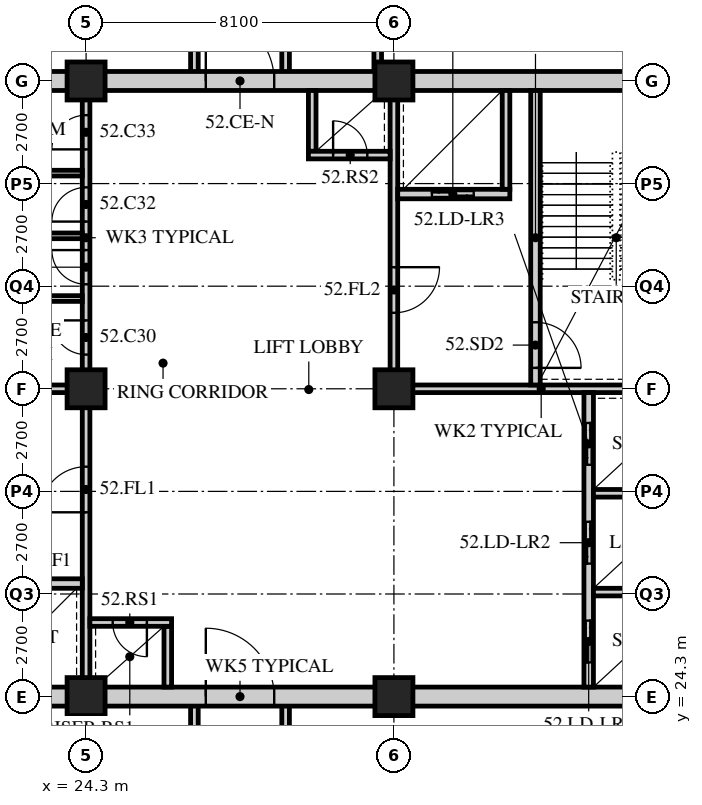
"""IFC4 building model, lengths in metres.
Left out: names, types, materials, properties, quantities, classifications, styles, units other than length and angle.
Written with IfcOpenShell. Run it as: python <this file> out.ifc"""

import sys

from ifc_helpers import new_model, si_unit, direction, frame, frame_2d, origin, origin_2d, place, context, subcontext, project, spatial, rectangle, hollow_rectangle, extrude, element, fill, save


model = new_model("IFC4")
c1 = context("Model", 3, precision=1e-05, world=origin(), true_north=direction((0.0, 1.0)))
c2 = subcontext(c1, "Body", "Model", "MODEL_VIEW")
j1 = project(units=[si_unit("LENGTHUNIT", "METRE"), si_unit("PLANEANGLEUNIT", "RADIAN")], contexts=[c1])
p1 = place(None, origin())
s1 = spatial("IfcSite", under=j1, at=p1, CompositionType="ELEMENT")
p2 = place(p1, origin())
s2 = spatial("IfcBuilding", under=s1, at=p2, CompositionType="ELEMENT")
p3 = place(p2, frame((0.0, 0.0, 202.8)))
s3 = spatial("IfcBuildingStorey", under=s2, at=p3, CompositionType="ELEMENT", Elevation=202.8)
for number, where, z_axis, x_axis in (
    (1, (24.3, 24.3, 0.0), (0.0, 0.0, 1.0), (1.0, 0.0, 0.0)),
    (2, (24.3, 32.4, 0.0), (0.0, 0.0, 1.0), (1.0, 0.0, 0.0)),
    (3, (24.3, 40.5, 0.0), (0.0, 0.0, 1.0), (1.0, 0.0, 0.0)),
    (4, (32.4, 24.3, 0.0), (0.0, 0.0, 1.0), (1.0, 0.0, 0.0)),
    (5, (32.4, 32.4, 0.0), (0.0, 0.0, 1.0), (1.0, 0.0, 0.0)),
    (6, (32.4, 40.5, 0.0), (0.0, 0.0, 1.0), (1.0, 0.0, 0.0)),
):
    element("IfcColumn", number, at=place(p3, frame(where, z_axis=z_axis, x_axis=x_axis)), inside=s3, PredefinedType="COLUMN", context=c2, shape_type="SweptSolid", body=[
        extrude(hollow_rectangle(XDim=1.0, YDim=1.0, WallThickness=0.1, at=origin_2d()), origin(), (0.0, 0.0, 1.0), 3.6),
    ])
for number, where, z_axis, x_axis in (
    (7, (27.15, 20.7, 0.0), (0.0, 0.0, 1.0), (0.0, 1.0, 0.0)),
    (8, (29.55, 20.7, 0.0), (0.0, 0.0, 1.0), (0.0, 1.0, 0.0)),
):
    element("IfcWall", number, at=place(p3, frame(where, z_axis=z_axis, x_axis=x_axis)), inside=s3, PredefinedType="SOLIDWALL", context=c2, shape_type="SweptSolid", body=[
        extrude(rectangle(XDim=3.6, YDim=0.2, at=frame_2d((1.8, 0.0))), origin(), (0.0, 0.0, 1.0), 3.39),
    ])
p4 = place(p3, frame((31.974, 45.45, 0.0), z_axis=(0.0, 0.0, 1.0), x_axis=(0.0, -1.0, 0.0)))
e9 = element("IfcWall", 9, at=p4, inside=s3, PredefinedType="SOLIDWALL", context=c2, shape_type="SweptSolid", body=[
    extrude(rectangle(XDim=4.95, YDim=0.2, at=frame_2d((2.475, 0.0))), origin(), (0.0, 0.0, 1.0), 2.69),
])
for number, where, z_axis, x_axis in (
    (10, (27.15, 40.5, 0.0), (0.0, 0.0, 1.0), (0.0, 1.0, 0.0)),
    (11, (29.55, 40.5, 0.0), (0.0, 0.0, 1.0), (0.0, 1.0, 0.0)),
):
    element("IfcWall", number, at=place(p3, frame(where, z_axis=z_axis, x_axis=x_axis)), inside=s3, PredefinedType="SOLIDWALL", context=c2, shape_type="SweptSolid", body=[
        extrude(rectangle(XDim=4.95, YDim=0.2, at=frame_2d((2.475, 0.0))), origin(), (0.0, 0.0, 1.0), 3.39),
    ])
p5 = place(p3, frame((15.95, 24.3, 0.0), z_axis=(0.0, 0.0, 1.0), x_axis=(1.0, 0.0, 0.0)))
e12 = element("IfcWall", 12, at=p5, inside=s3, PredefinedType="SOLIDWALL", context=c2, shape_type="SweptSolid", body=[
    extrude(rectangle(XDim=24.8, YDim=0.5, at=frame_2d((12.4, 0.0))), origin(), (0.0, 0.0, 1.0), 2.74),
])
p6 = place(p5, frame((11.5, 0.0, 0.0)))
e13 = element("IfcOpeningElement", 13, at=p6, cuts=e12, PredefinedType="OPENING", context=c2, shape_type="SweptSolid", body=[
    extrude(rectangle(XDim=1.8, YDim=2.4, at=frame_2d((0.9, 1.2))), frame((0.0, 0.26, 0.0), z_axis=(0.0, -1.0, 0.0), x_axis=(1.0, 0.0, 0.0)), (0.0, 0.0, 1.0), 0.52),
])
p7 = place(p3, frame((15.95, 40.5, 0.0), z_axis=(0.0, 0.0, 1.0), x_axis=(1.0, 0.0, 0.0)))
e14 = element("IfcWall", 14, at=p7, inside=s3, PredefinedType="SOLIDWALL", context=c2, shape_type="SweptSolid", body=[
    extrude(rectangle(XDim=24.8, YDim=0.5, at=frame_2d((12.4, 0.0))), origin(), (0.0, 0.0, 1.0), 2.74),
])
p8 = place(p7, frame((11.5, 0.0, 0.0)))
e15 = element("IfcOpeningElement", 15, at=p8, cuts=e14, PredefinedType="OPENING", context=c2, shape_type="SweptSolid", body=[
    extrude(rectangle(XDim=1.8, YDim=2.4, at=frame_2d((0.9, 1.2))), frame((0.0, 0.26, 0.0), z_axis=(0.0, -1.0, 0.0), x_axis=(1.0, 0.0, 0.0)), (0.0, 0.0, 1.0), 0.52),
])
p9 = place(p3, frame((16.45, 32.4, 0.0), z_axis=(0.0, 0.0, 1.0), x_axis=(1.0, 0.0, 0.0)))
e16 = element("IfcWall", 16, at=p9, inside=s3, PredefinedType="SOLIDWALL", context=c2, shape_type="SweptSolid", body=[
    extrude(rectangle(XDim=7.95, YDim=0.2, at=frame_2d((3.975, 0.0))), origin(), (0.0, 0.0, 1.0), 2.778),
])
p10 = place(p3, frame((24.3, 24.55, 0.0), z_axis=(0.0, 0.0, 1.0), x_axis=(0.0, 1.0, 0.0)))
e17 = element("IfcWall", 17, at=p10, inside=s3, PredefinedType="SOLIDWALL", context=c2, shape_type="SweptSolid", body=[
    extrude(rectangle(XDim=7.75, YDim=0.2, at=frame_2d((3.875, 0.0))), origin(), (0.0, 0.0, 1.0), 2.778),
])
p11 = place(p10, frame((4.6, 0.0, 0.0)))
e18 = element("IfcOpeningElement", 18, at=p11, cuts=e17, PredefinedType="OPENING", context=c2, shape_type="SweptSolid", body=[
    extrude(rectangle(XDim=1.2, YDim=2.1, at=frame_2d((0.6, 1.05))), frame((0.0, 0.11, 0.0), z_axis=(0.0, -1.0, 0.0), x_axis=(1.0, 0.0, 0.0)), (0.0, 0.0, 1.0), 0.22),
])
p12 = place(p3, frame((21.25, 27.275, 0.0), z_axis=(0.0, 0.0, 1.0), x_axis=(1.0, 0.0, 0.0)))
e19 = element("IfcWall", 19, at=p12, inside=s3, PredefinedType="SOLIDWALL", context=c2, shape_type="SweptSolid", body=[
    extrude(rectangle(XDim=2.95, YDim=0.25, at=frame_2d((1.475, 0.0))), origin(), (0.0, 0.0, 1.0), 3.39),
])
p13 = place(p12, frame((0.95, 0.0, 0.0)))
e20 = element("IfcOpeningElement", 20, at=p13, cuts=e19, PredefinedType="OPENING", context=c2, shape_type="SweptSolid", body=[
    extrude(rectangle(XDim=1.1, YDim=2.4, at=frame_2d((0.55, 1.2))), frame((0.0, 0.135, 0.0), z_axis=(0.0, -1.0, 0.0), x_axis=(1.0, 0.0, 0.0)), (0.0, 0.0, 1.0), 0.27),
])
p14 = place(p3, frame((26.45, 24.55, 0.0), z_axis=(0.0, 0.0, 1.0), x_axis=(0.0, 1.0, 0.0)))
e21 = element("IfcWall", 21, at=p14, inside=s3, PredefinedType="SOLIDWALL", context=c2, shape_type="SweptSolid", body=[
    extrude(rectangle(XDim=1.6, YDim=0.2, at=frame_2d((0.8, 0.0))), origin(), (0.0, 0.0, 1.0), 3.39),
])
p15 = place(p3, frame((24.4, 26.25, 0.0), z_axis=(0.0, 0.0, 1.0), x_axis=(1.0, 0.0, 0.0)))
e22 = element("IfcWall", 22, at=p15, inside=s3, PredefinedType="SOLIDWALL", context=c2, shape_type="SweptSolid", body=[
    extrude(rectangle(XDim=2.15, YDim=0.2, at=frame_2d((1.075, 0.0))), origin(), (0.0, 0.0, 1.0), 3.39),
])
p16 = place(p15, frame((0.6, 0.0, 0.0)))
e23 = element("IfcOpeningElement", 23, at=p16, cuts=e22, PredefinedType="OPENING", context=c2, shape_type="SweptSolid", body=[
    extrude(rectangle(XDim=0.9, YDim=2.1, at=frame_2d((0.45, 1.05))), frame((0.0, 0.11, 0.0), z_axis=(0.0, -1.0, 0.0), x_axis=(1.0, 0.0, 0.0)), (0.0, 0.0, 1.0), 0.22),
])
p17 = place(p3, frame((32.3, 32.4, 0.0), z_axis=(0.0, 0.0, 1.0), x_axis=(1.0, 0.0, 0.0)))
e24 = element("IfcWall", 24, at=p17, inside=s3, PredefinedType="SOLIDWALL", context=c2, shape_type="SweptSolid", body=[
    extrude(rectangle(XDim=7.95, YDim=0.2, at=frame_2d((3.975, 0.0))), origin(), (0.0, 0.0, 1.0), 2.778),
])
p18 = place(p3, frame((32.4, 32.5, 0.0), z_axis=(0.0, 0.0, 1.0), x_axis=(0.0, 1.0, 0.0)))
e25 = element("IfcWall", 25, at=p18, inside=s3, PredefinedType="SOLIDWALL", context=c2, shape_type="SweptSolid", body=[
    extrude(rectangle(XDim=7.75, YDim=0.2, at=frame_2d((3.875, 0.0))), origin(), (0.0, 0.0, 1.0), 2.778),
])
p19 = place(p18, frame((1.9, 0.0, 0.0)))
e26 = element("IfcOpeningElement", 26, at=p19, cuts=e25, PredefinedType="OPENING", context=c2, shape_type="SweptSolid", body=[
    extrude(rectangle(XDim=1.2, YDim=2.1, at=frame_2d((0.6, 1.05))), frame((0.0, 0.11, 0.0), z_axis=(0.0, -1.0, 0.0), x_axis=(1.0, 0.0, 0.0)), (0.0, 0.0, 1.0), 0.22),
])
p20 = place(p3, frame((37.525, 24.55, 0.0), z_axis=(0.0, 0.0, 1.0), x_axis=(0.0, 1.0, 0.0)))
e27 = element("IfcWall", 27, at=p20, inside=s3, PredefinedType="SOLIDWALL", context=c2, shape_type="SweptSolid", body=[
    extrude(rectangle(XDim=7.75, YDim=0.25, at=frame_2d((3.875, 0.0))), origin(), (0.0, 0.0, 1.0), 3.39),
])
p21 = place(p20, frame((0.65, 0.0, 0.0)))
e28 = element("IfcOpeningElement", 28, at=p21, cuts=e27, PredefinedType="OPENING", context=c2, shape_type="SweptSolid", body=[
    extrude(rectangle(XDim=1.1, YDim=2.4, at=frame_2d((0.55, 1.2))), frame((0.0, 0.135, 0.0), z_axis=(0.0, -1.0, 0.0), x_axis=(1.0, 0.0, 0.0)), (0.0, 0.0, 1.0), 0.27),
])
p22 = place(p20, frame((3.25, 0.0, 0.0)))
e29 = element("IfcOpeningElement", 29, at=p22, cuts=e27, PredefinedType="OPENING", context=c2, shape_type="SweptSolid", body=[
    extrude(rectangle(XDim=1.1, YDim=2.4, at=frame_2d((0.55, 1.2))), frame((0.0, 0.135, 0.0), z_axis=(0.0, -1.0, 0.0), x_axis=(1.0, 0.0, 0.0)), (0.0, 0.0, 1.0), 0.27),
])
p23 = place(p20, frame((5.85, 0.0, 0.0)))
e30 = element("IfcOpeningElement", 30, at=p23, cuts=e27, PredefinedType="OPENING", context=c2, shape_type="SweptSolid", body=[
    extrude(rectangle(XDim=1.1, YDim=2.4, at=frame_2d((0.55, 1.2))), frame((0.0, 0.135, 0.0), z_axis=(0.0, -1.0, 0.0), x_axis=(1.0, 0.0, 0.0)), (0.0, 0.0, 1.0), 0.27),
])
for number, where, z_axis, x_axis in (
    (31, (37.65, 27.05, 0.0), (0.0, 0.0, 1.0), (1.0, 0.0, 0.0)),
    (32, (37.65, 29.65, 0.0), (0.0, 0.0, 1.0), (1.0, 0.0, 0.0)),
):
    element("IfcWall", number, at=place(p3, frame(where, z_axis=z_axis, x_axis=x_axis)), inside=s3, PredefinedType="SOLIDWALL", context=c2, shape_type="SweptSolid", body=[
        extrude(rectangle(XDim=2.6, YDim=0.2, at=frame_2d((1.3, 0.0))), origin(), (0.0, 0.0, 1.0), 3.39),
    ])
p24 = place(p3, frame((36.125, 32.5, 0.0), z_axis=(0.0, 0.0, 1.0), x_axis=(0.0, 1.0, 0.0)))
e33 = element("IfcWall", 33, at=p24, inside=s3, PredefinedType="SOLIDWALL", context=c2, shape_type="SweptSolid", body=[
    extrude(rectangle(XDim=7.75, YDim=0.25, at=frame_2d((3.875, 0.0))), origin(), (0.0, 0.0, 1.0), 3.39),
])
p25 = place(p24, frame((0.45, 0.0, 0.0)))
e34 = element("IfcOpeningElement", 34, at=p25, cuts=e33, PredefinedType="OPENING", context=c2, shape_type="SweptSolid", body=[
    extrude(rectangle(XDim=1.2, YDim=2.1, at=frame_2d((0.6, 1.05))), frame((0.0, 0.135, 0.0), z_axis=(0.0, -1.0, 0.0), x_axis=(1.0, 0.0, 0.0)), (0.0, 0.0, 1.0), 0.27),
])
p26 = place(p3, frame((32.5, 37.525, 0.0), z_axis=(0.0, 0.0, 1.0), x_axis=(1.0, 0.0, 0.0)))
e35 = element("IfcWall", 35, at=p26, inside=s3, PredefinedType="SOLIDWALL", context=c2, shape_type="SweptSolid", body=[
    extrude(rectangle(XDim=2.95, YDim=0.25, at=frame_2d((1.475, 0.0))), origin(), (0.0, 0.0, 1.0), 3.39),
])
p27 = place(p26, frame((0.9, 0.0, 0.0)))
e36 = element("IfcOpeningElement", 36, at=p27, cuts=e35, PredefinedType="OPENING", context=c2, shape_type="SweptSolid", body=[
    extrude(rectangle(XDim=1.1, YDim=2.4, at=frame_2d((0.55, 1.2))), frame((0.0, 0.135, 0.0), z_axis=(0.0, -1.0, 0.0), x_axis=(1.0, 0.0, 0.0)), (0.0, 0.0, 1.0), 0.27),
])
p28 = place(p3, frame((35.35, 37.65, 0.0), z_axis=(0.0, 0.0, 1.0), x_axis=(0.0, 1.0, 0.0)))
e37 = element("IfcWall", 37, at=p28, inside=s3, PredefinedType="SOLIDWALL", context=c2, shape_type="SweptSolid", body=[
    extrude(rectangle(XDim=2.6, YDim=0.2, at=frame_2d((1.3, 0.0))), origin(), (0.0, 0.0, 1.0), 3.39),
])
p29 = place(p3, frame((30.25, 38.65, 0.0), z_axis=(0.0, 0.0, 1.0), x_axis=(0.0, 1.0, 0.0)))
e38 = element("IfcWall", 38, at=p29, inside=s3, PredefinedType="SOLIDWALL", context=c2, shape_type="SweptSolid", body=[
    extrude(rectangle(XDim=1.6, YDim=0.2, at=frame_2d((0.8, 0.0))), origin(), (0.0, 0.0, 1.0), 3.39),
])
p30 = place(p3, frame((30.15, 38.55, 0.0), z_axis=(0.0, 0.0, 1.0), x_axis=(1.0, 0.0, 0.0)))
e39 = element("IfcWall", 39, at=p30, inside=s3, PredefinedType="SOLIDWALL", context=c2, shape_type="SweptSolid", body=[
    extrude(rectangle(XDim=2.15, YDim=0.2, at=frame_2d((1.075, 0.0))), origin(), (0.0, 0.0, 1.0), 3.39),
])
p31 = place(p30, frame((0.65, 0.0, 0.0)))
e40 = element("IfcOpeningElement", 40, at=p31, cuts=e39, PredefinedType="OPENING", context=c2, shape_type="SweptSolid", body=[
    extrude(rectangle(XDim=0.9, YDim=2.1, at=frame_2d((0.45, 1.05))), frame((0.0, 0.11, 0.0), z_axis=(0.0, -1.0, 0.0), x_axis=(1.0, 0.0, 0.0)), (0.0, 0.0, 1.0), 0.22),
])
p32 = place(p3, frame((24.3, 32.5, 0.0), z_axis=(0.0, 0.0, 1.0), x_axis=(0.0, 1.0, 0.0)))
e41 = element("IfcWall", 41, at=p32, inside=s3, PredefinedType="PARTITIONING", context=c2, shape_type="SweptSolid", body=[
    extrude(rectangle(XDim=7.75, YDim=0.2, at=frame_2d((3.875, 0.0))), origin(), (0.0, 0.0, 1.0), 2.778),
])
p33 = place(p32, frame((0.8, 0.0, 0.0)))
e42 = element("IfcOpeningElement", 42, at=p33, cuts=e41, PredefinedType="OPENING", context=c2, shape_type="SweptSolid", body=[
    extrude(rectangle(XDim=0.9, YDim=2.1, at=frame_2d((0.45, 1.05))), frame((0.0, 0.11, 0.0), z_axis=(0.0, -1.0, 0.0), x_axis=(1.0, 0.0, 0.0)), (0.0, 0.0, 1.0), 0.22),
])
p34 = place(p32, frame((2.65, 0.0, 0.0)))
e43 = element("IfcOpeningElement", 43, at=p34, cuts=e41, PredefinedType="OPENING", context=c2, shape_type="SweptSolid", body=[
    extrude(rectangle(XDim=0.9, YDim=2.1, at=frame_2d((0.45, 1.05))), frame((0.0, 0.11, 0.0), z_axis=(0.0, -1.0, 0.0), x_axis=(1.0, 0.0, 0.0)), (0.0, 0.0, 1.0), 0.22),
])
p35 = place(p32, frame((4.3, 0.0, 0.0)))
e44 = element("IfcOpeningElement", 44, at=p35, cuts=e41, PredefinedType="OPENING", context=c2, shape_type="SweptSolid", body=[
    extrude(rectangle(XDim=0.9, YDim=2.1, at=frame_2d((0.45, 1.05))), frame((0.0, 0.11, 0.0), z_axis=(0.0, -1.0, 0.0), x_axis=(1.0, 0.0, 0.0)), (0.0, 0.0, 1.0), 0.22),
])
p36 = place(p32, frame((6.2, 0.0, 0.0)))
e45 = element("IfcOpeningElement", 45, at=p36, cuts=e41, PredefinedType="OPENING", context=c2, shape_type="SweptSolid", body=[
    extrude(rectangle(XDim=0.9, YDim=2.1, at=frame_2d((0.45, 1.05))), frame((0.0, 0.11, 0.0), z_axis=(0.0, -1.0, 0.0), x_axis=(1.0, 0.0, 0.0)), (0.0, 0.0, 1.0), 0.22),
])
for number, where, z_axis, x_axis in (
    (46, (21.05, 34.775, 0.0), (0.0, 0.0, 1.0), (1.0, 0.0, 0.0)),
    (47, (21.05, 36.425, 0.0), (0.0, 0.0, 1.0), (1.0, 0.0, 0.0)),
):
    element("IfcWall", number, at=place(p3, frame(where, z_axis=z_axis, x_axis=x_axis)), inside=s3, PredefinedType="PARTITIONING", context=c2, shape_type="SweptSolid", body=[
        extrude(rectangle(XDim=3.15, YDim=0.15, at=frame_2d((1.575, 0.0))), origin(), (0.0, 0.0, 1.0), 3.39),
    ])
p37 = place(p3, frame((21.2, 38.075, 0.0), z_axis=(0.0, 0.0, 1.0), x_axis=(1.0, 0.0, 0.0)))
e48 = element("IfcWall", 48, at=p37, inside=s3, PredefinedType="PARTITIONING", context=c2, shape_type="SweptSolid", body=[
    extrude(rectangle(XDim=3.0, YDim=0.15, at=frame_2d((1.5, 0.0))), origin(), (0.0, 0.0, 1.0), 3.39),
])
p38 = place(p33, origin())
e49 = element("IfcDoor", 49, at=p38, inside=s3, OperationType="SINGLE_SWING_RIGHT", PredefinedType="DOOR", context=c2, shape_type="SweptSolid", body=[
    extrude(rectangle(XDim=0.9, YDim=2.1, at=frame_2d((0.45, 1.05))), frame((0.0, 0.025, 0.0), z_axis=(0.0, -1.0, 0.0), x_axis=(1.0, 0.0, 0.0)), (0.0, 0.0, 1.0), 0.05),
])
fill(e42, e49)
p39 = place(p34, origin())
e50 = element("IfcDoor", 50, at=p39, inside=s3, OperationType="SINGLE_SWING_RIGHT", PredefinedType="DOOR", context=c2, shape_type="SweptSolid", body=[
    extrude(rectangle(XDim=0.9, YDim=2.1, at=frame_2d((0.45, 1.05))), frame((0.0, 0.025, 0.0), z_axis=(0.0, -1.0, 0.0), x_axis=(1.0, 0.0, 0.0)), (0.0, 0.0, 1.0), 0.05),
])
fill(e43, e50)
p40 = place(p35, origin())
e51 = element("IfcDoor", 51, at=p40, inside=s3, OperationType="SINGLE_SWING_LEFT", PredefinedType="DOOR", context=c2, shape_type="SweptSolid", body=[
    extrude(rectangle(XDim=0.9, YDim=2.1, at=frame_2d((0.45, 1.05))), frame((0.0, 0.025, 0.0), z_axis=(0.0, -1.0, 0.0), x_axis=(1.0, 0.0, 0.0)), (0.0, 0.0, 1.0), 0.05),
])
fill(e44, e51)
p41 = place(p36, origin())
e52 = element("IfcDoor", 52, at=p41, inside=s3, OperationType="SINGLE_SWING_LEFT", PredefinedType="DOOR", context=c2, shape_type="SweptSolid", body=[
    extrude(rectangle(XDim=0.9, YDim=2.1, at=frame_2d((0.45, 1.05))), frame((0.0, 0.025, 0.0), z_axis=(0.0, -1.0, 0.0), x_axis=(1.0, 0.0, 0.0)), (0.0, 0.0, 1.0), 0.05),
])
fill(e45, e52)
p42 = place(p11, origin())
e53 = element("IfcDoor", 53, at=p42, inside=s3, OperationType="SINGLE_SWING_LEFT", PredefinedType="DOOR", context=c2, shape_type="SweptSolid", body=[
    extrude(rectangle(XDim=1.2, YDim=2.1, at=frame_2d((0.6, 1.05))), frame((0.0, 0.025, 0.0), z_axis=(0.0, -1.0, 0.0), x_axis=(1.0, 0.0, 0.0)), (0.0, 0.0, 1.0), 0.05),
])
fill(e18, e53)
p43 = place(p16, origin())
e54 = element("IfcDoor", 54, at=p43, inside=s3, OperationType="SINGLE_SWING_LEFT", PredefinedType="DOOR", context=c2, shape_type="SweptSolid", body=[
    extrude(rectangle(XDim=0.9, YDim=2.1, at=frame_2d((0.45, 1.05))), frame((0.0, 0.025, 0.0), z_axis=(0.0, -1.0, 0.0), x_axis=(1.0, 0.0, 0.0)), (0.0, 0.0, 1.0), 0.05),
])
fill(e23, e54)
p44 = place(p25, origin())
e55 = element("IfcDoor", 55, at=p44, inside=s3, OperationType="SINGLE_SWING_RIGHT", PredefinedType="DOOR", context=c2, shape_type="SweptSolid", body=[
    extrude(rectangle(XDim=1.2, YDim=2.1, at=frame_2d((0.6, 1.05))), frame((0.0, 0.025, 0.0), z_axis=(0.0, -1.0, 0.0), x_axis=(1.0, 0.0, 0.0)), (0.0, 0.0, 1.0), 0.05),
])
fill(e34, e55)
p45 = place(p19, origin())
e56 = element("IfcDoor", 56, at=p45, inside=s3, OperationType="SINGLE_SWING_LEFT", PredefinedType="DOOR", context=c2, shape_type="SweptSolid", body=[
    extrude(rectangle(XDim=1.2, YDim=2.1, at=frame_2d((0.6, 1.05))), frame((0.0, 0.025, 0.0), z_axis=(0.0, -1.0, 0.0), x_axis=(1.0, 0.0, 0.0)), (0.0, 0.0, 1.0), 0.05),
])
fill(e26, e56)
p46 = place(p31, origin())
e57 = element("IfcDoor", 57, at=p46, inside=s3, OperationType="SINGLE_SWING_LEFT", PredefinedType="DOOR", context=c2, shape_type="SweptSolid", body=[
    extrude(rectangle(XDim=0.9, YDim=2.1, at=frame_2d((0.45, 1.05))), frame((0.0, 0.025, 0.0), z_axis=(0.0, -1.0, 0.0), x_axis=(1.0, 0.0, 0.0)), (0.0, 0.0, 1.0), 0.05),
])
fill(e40, e57)
p47 = place(p21, origin())
e58 = element("IfcDoor", 58, at=p47, inside=s3, OperationType="DOUBLE_DOOR_SLIDING", PredefinedType="DOOR", context=c2, shape_type="SweptSolid", body=[
    extrude(rectangle(XDim=1.1, YDim=2.4, at=frame_2d((0.55, 1.2))), frame((0.0, 0.025, 0.0), z_axis=(0.0, -1.0, 0.0), x_axis=(1.0, 0.0, 0.0)), (0.0, 0.0, 1.0), 0.05),
])
fill(e28, e58)
p48 = place(p22, origin())
e59 = element("IfcDoor", 59, at=p48, inside=s3, OperationType="DOUBLE_DOOR_SLIDING", PredefinedType="DOOR", context=c2, shape_type="SweptSolid", body=[
    extrude(rectangle(XDim=1.1, YDim=2.4, at=frame_2d((0.55, 1.2))), frame((0.0, 0.025, 0.0), z_axis=(0.0, -1.0, 0.0), x_axis=(1.0, 0.0, 0.0)), (0.0, 0.0, 1.0), 0.05),
])
fill(e29, e59)
p49 = place(p23, origin())
e60 = element("IfcDoor", 60, at=p49, inside=s3, OperationType="DOUBLE_DOOR_SLIDING", PredefinedType="DOOR", context=c2, shape_type="SweptSolid", body=[
    extrude(rectangle(XDim=1.1, YDim=2.4, at=frame_2d((0.55, 1.2))), frame((0.0, 0.025, 0.0), z_axis=(0.0, -1.0, 0.0), x_axis=(1.0, 0.0, 0.0)), (0.0, 0.0, 1.0), 0.05),
])
fill(e30, e60)
p50 = place(p27, origin())
e61 = element("IfcDoor", 61, at=p50, inside=s3, OperationType="DOUBLE_DOOR_SLIDING", PredefinedType="DOOR", context=c2, shape_type="SweptSolid", body=[
    extrude(rectangle(XDim=1.1, YDim=2.4, at=frame_2d((0.55, 1.2))), frame((0.0, 0.025, 0.0), z_axis=(0.0, -1.0, 0.0), x_axis=(1.0, 0.0, 0.0)), (0.0, 0.0, 1.0), 0.05),
])
fill(e36, e61)
p51 = place(p6, origin())
e62 = element("IfcDoor", 62, at=p51, inside=s3, OperationType="DOUBLE_DOOR_SINGLE_SWING", PredefinedType="DOOR", context=c2, shape_type="SweptSolid", body=[
    extrude(rectangle(XDim=1.8, YDim=2.4, at=frame_2d((0.9, 1.2))), frame((0.0, 0.025, 0.0), z_axis=(0.0, -1.0, 0.0), x_axis=(1.0, 0.0, 0.0)), (0.0, 0.0, 1.0), 0.05),
])
fill(e13, e62)
p52 = place(p8, origin())
e63 = element("IfcDoor", 63, at=p52, inside=s3, OperationType="DOUBLE_DOOR_SINGLE_SWING", PredefinedType="DOOR", context=c2, shape_type="SweptSolid", body=[
    extrude(rectangle(XDim=1.8, YDim=2.4, at=frame_2d((0.9, 1.2))), frame((0.0, 0.025, 0.0), z_axis=(0.0, -1.0, 0.0), x_axis=(1.0, 0.0, 0.0)), (0.0, 0.0, 1.0), 0.05),
])
fill(e15, e63)
save(model, sys.argv[1])
